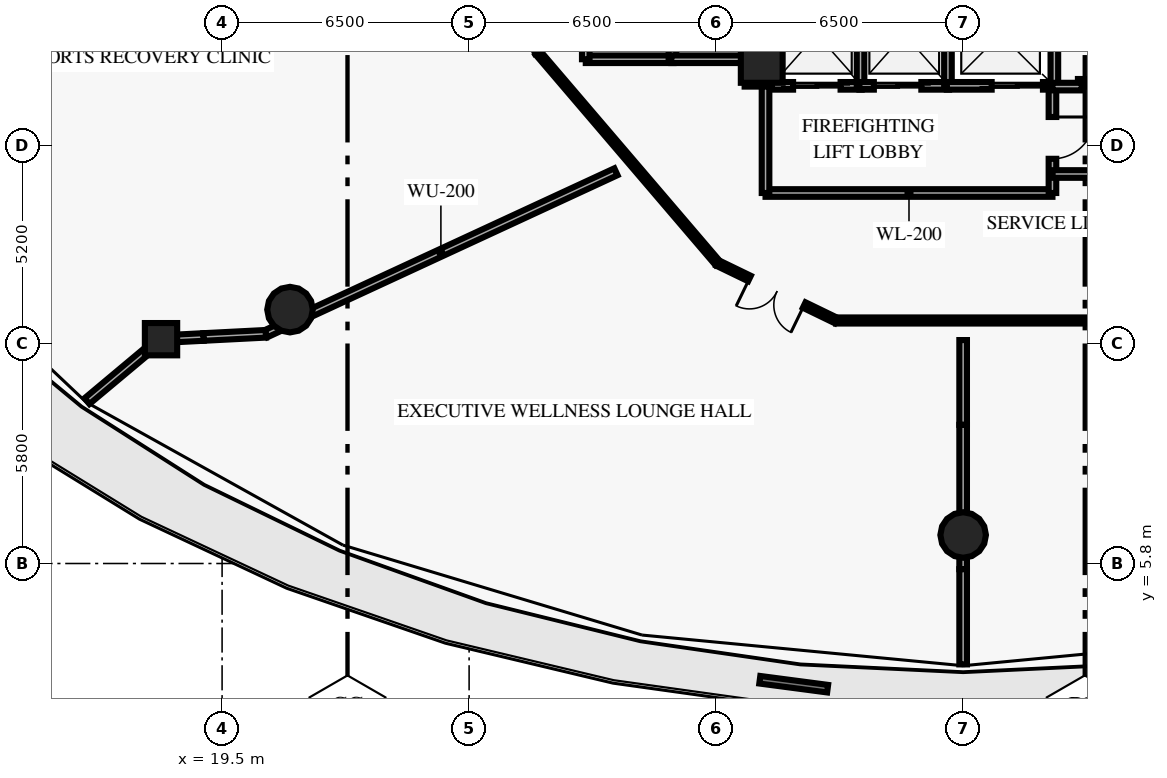
"""IFC4 building model, lengths in metres.
Left out: names, types, materials, properties, quantities, classifications, styles, units other than length and angle.
Written with IfcOpenShell. Run it as: python <this file> out.ifc"""

import sys

from ifc_helpers import new_model, si_unit, direction, frame, frame_2d, origin, origin_2d, place, context, subcontext, project, spatial, rectangle, circle, extrude, element, fill, save


model = new_model("IFC4")
c1 = context("Model", 3, precision=1e-05, world=origin(), true_north=direction((0.0, 1.0)))
c2 = subcontext(c1, "Body", "Model", "MODEL_VIEW")
j1 = project(units=[si_unit("LENGTHUNIT", "METRE"), si_unit("PLANEANGLEUNIT", "RADIAN")], contexts=[c1])
p1 = place(None, origin())
s1 = spatial("IfcSite", under=j1, at=p1, CompositionType="ELEMENT")
p2 = place(p1, origin())
s2 = spatial("IfcBuilding", under=s1, at=p2, CompositionType="ELEMENT")
p3 = place(p2, frame((0.0, 0.0, 16.0)))
s3 = spatial("IfcBuildingStorey", under=s2, at=p3, CompositionType="ELEMENT", Elevation=16.0)
p4 = place(p3, frame((33.7, 19.0, 0.0), z_axis=(0.0, 0.0, 1.0), x_axis=(1.0, 0.0, 0.0)))
e1 = element("IfcColumn", 1, at=p4, inside=s3, PredefinedType="PILASTER", context=c2, shape_type="SweptSolid", body=[
    extrude(rectangle(XDim=1.1, YDim=1.1, at=origin_2d()), origin(), (0.0, 0.0, 1.0), 4.74),
])
for number, where, z_axis, x_axis in (
    (2, (21.287, 12.481, 0.0), (0.0, 0.0, 1.0), (1.0, 0.0, 0.0)),
    (3, (39.0, 6.55, 0.0), (0.0, 0.0, 1.0), (1.0, 0.0, 0.0)),
):
    element("IfcColumn", number, at=place(p3, frame(where, z_axis=z_axis, x_axis=x_axis)), inside=s3, PredefinedType="COLUMN", context=c2, shape_type="SweptSolid", body=[
        extrude(circle(Radius=0.6, at=origin_2d()), origin(), (0.0, 0.0, 1.0), 4.74),
    ])
p5 = place(p3, frame((17.893, 11.703, 0.0), z_axis=(0.0, 0.0, 1.0), x_axis=(1.0, 0.0, 0.0)))
e4 = element("IfcColumn", 4, at=p5, inside=s3, PredefinedType="COLUMN", context=c2, shape_type="SweptSolid", body=[
    extrude(rectangle(XDim=0.85, YDim=0.85, at=origin_2d()), origin(), (0.0, 0.0, 1.0), 4.74),
])
p6 = place(p3, frame((33.7, 18.35, 0.0), z_axis=(0.0, 0.0, 1.0), x_axis=(0.0, 1.0, 0.0)))
e5 = element("IfcWall", 5, at=p6, inside=s3, PredefinedType="SHEAR", context=c2, shape_type="SweptSolid", body=[
    extrude(rectangle(XDim=2.95, YDim=0.9, at=frame_2d((1.475, 0.0))), origin(), (0.0, 0.0, 1.0), 4.74),
])
p7 = place(p3, frame((35.434, 2.506, 0.0), z_axis=(0.0, 0.0, 1.0), x_axis=(-0.991456141502, 0.130440482512, 0.0)))
e6 = element("IfcWall", 6, at=p7, inside=s3, PredefinedType="ELEMENTEDWALL", context=c2, shape_type="SweptSolid", body=[
    extrude(rectangle(XDim=1.801, YDim=0.2, at=frame_2d((0.9, 0.0))), origin(), (0.0, 0.0, 1.0), 0.65),
])
for number, where, z_axis, x_axis in (
    (7, (29.07, 19.07, 0.0), (0.0, 0.0, 1.0), (1.0, 0.0, 0.0)),
    (8, (29.07, 19.07, 0.0), (0.0, 0.0, 1.0), (0.0, 1.0, 0.0)),
    (9, (31.35, 19.07, 0.0), (0.0, 0.0, 1.0), (0.0, 1.0, 0.0)),
):
    element("IfcWall", number, at=place(p3, frame(where, z_axis=z_axis, x_axis=x_axis)), inside=s3, PredefinedType="SOLIDWALL", context=c2, shape_type="SweptSolid", body=[
        extrude(rectangle(XDim=2.31, YDim=0.2, at=frame_2d((1.155, 0.0))), origin(), (0.0, 0.0, 1.0), 4.74),
    ])
p8 = place(p3, frame((31.32, 19.07, 0.0), z_axis=(0.0, 0.0, 1.0), x_axis=(1.0, 0.0, 0.0)))
e10 = element("IfcWall", 10, at=p8, inside=s3, PredefinedType="SOLIDWALL", context=c2, shape_type="SweptSolid", body=[
    extrude(rectangle(XDim=2.11, YDim=0.2, at=frame_2d((1.055, 0.0))), origin(), (0.0, 0.0, 1.0), 4.74),
])
p9 = place(p3, frame((33.97, 18.37, 0.0), z_axis=(0.0, 0.0, 1.0), x_axis=(1.0, 0.0, 0.0)))
e11 = element("IfcWall", 11, at=p9, inside=s3, PredefinedType="SOLIDWALL", context=c2, shape_type="SweptSolid", body=[
    extrude(rectangle(XDim=2.36, YDim=0.2, at=frame_2d((1.18, 0.0))), origin(), (0.0, 0.0, 1.0), 4.74),
])
p10 = place(p9, frame((0.555, 0.0, 0.0)))
e12 = element("IfcOpeningElement", 12, at=p10, cuts=e11, PredefinedType="OPENING", context=c2, shape_type="SweptSolid", body=[
    extrude(rectangle(XDim=1.25, YDim=2.2, at=frame_2d((0.625, 1.1))), frame((0.0, 0.11, 0.0), z_axis=(0.0, -1.0, 0.0), x_axis=(1.0, 0.0, 0.0)), (0.0, 0.0, 1.0), 0.22),
])
p11 = place(p3, frame((36.3, 18.37, 0.0), z_axis=(0.0, 0.0, 1.0), x_axis=(0.0, 1.0, 0.0)))
e13 = element("IfcWall", 13, at=p11, inside=s3, PredefinedType="SOLIDWALL", context=c2, shape_type="SweptSolid", body=[
    extrude(rectangle(XDim=2.71, YDim=0.2, at=frame_2d((1.355, 0.0))), origin(), (0.0, 0.0, 1.0), 4.74),
])
p12 = place(p3, frame((36.27, 18.37, 0.0), z_axis=(0.0, 0.0, 1.0), x_axis=(1.0, 0.0, 0.0)))
e14 = element("IfcWall", 14, at=p12, inside=s3, PredefinedType="SOLIDWALL", context=c2, shape_type="SweptSolid", body=[
    extrude(rectangle(XDim=2.36, YDim=0.2, at=frame_2d((1.18, 0.0))), origin(), (0.0, 0.0, 1.0), 4.74),
])
p13 = place(p12, frame((0.38, 0.0, 0.0)))
e15 = element("IfcOpeningElement", 15, at=p13, cuts=e14, PredefinedType="OPENING", context=c2, shape_type="SweptSolid", body=[
    extrude(rectangle(XDim=1.25, YDim=2.2, at=frame_2d((0.625, 1.1))), frame((0.0, 0.11, 0.0), z_axis=(0.0, -1.0, 0.0), x_axis=(1.0, 0.0, 0.0)), (0.0, 0.0, 1.0), 0.22),
])
p14 = place(p3, frame((38.6, 18.37, 0.0), z_axis=(0.0, 0.0, 1.0), x_axis=(0.0, 1.0, 0.0)))
e16 = element("IfcWall", 16, at=p14, inside=s3, PredefinedType="SOLIDWALL", context=c2, shape_type="SweptSolid", body=[
    extrude(rectangle(XDim=2.71, YDim=0.2, at=frame_2d((1.355, 0.0))), origin(), (0.0, 0.0, 1.0), 4.74),
])
p15 = place(p3, frame((38.57, 18.37, 0.0), z_axis=(0.0, 0.0, 1.0), x_axis=(1.0, 0.0, 0.0)))
e17 = element("IfcWall", 17, at=p15, inside=s3, PredefinedType="SOLIDWALL", context=c2, shape_type="SweptSolid", body=[
    extrude(rectangle(XDim=2.83, YDim=0.2, at=frame_2d((1.415, 0.0))), origin(), (0.0, 0.0, 1.0), 4.74),
])
p16 = place(p15, frame((1.18, 0.0, 0.0)))
e18 = element("IfcOpeningElement", 18, at=p16, cuts=e17, PredefinedType="OPENING", context=c2, shape_type="SweptSolid", body=[
    extrude(rectangle(XDim=1.35, YDim=2.18, at=frame_2d((0.675, 1.09))), frame((0.0, 0.11, 0.0), z_axis=(0.0, -1.0, 0.0), x_axis=(1.0, 0.0, 0.0)), (0.0, 0.0, 1.0), 0.22),
])
p17 = place(p3, frame((41.4, 18.37, 0.0), z_axis=(0.0, 0.0, 1.0), x_axis=(0.0, 1.0, 0.0)))
e19 = element("IfcWall", 19, at=p17, inside=s3, PredefinedType="SOLIDWALL", context=c2, shape_type="SweptSolid", body=[
    extrude(rectangle(XDim=2.71, YDim=0.2, at=frame_2d((1.355, 0.0))), origin(), (0.0, 0.0, 1.0), 4.74),
])
p18 = place(p3, frame((33.8, 15.55, 0.0), z_axis=(0.0, 0.0, 1.0), x_axis=(1.0, 0.0, 0.0)))
e20 = element("IfcWall", 20, at=p18, inside=s3, PredefinedType="SOLIDWALL", context=c2, shape_type="SweptSolid", body=[
    extrude(rectangle(XDim=7.55, YDim=0.2, at=frame_2d((3.775, 0.0))), origin(), (0.0, 0.0, 1.0), 4.74),
])
p19 = place(p3, frame((33.8, 15.55, 0.0), z_axis=(0.0, 0.0, 1.0), x_axis=(0.0, 1.0, 0.0)))
e21 = element("IfcWall", 21, at=p19, inside=s3, PredefinedType="SOLIDWALL", context=c2, shape_type="SweptSolid", body=[
    extrude(rectangle(XDim=2.8, YDim=0.2, at=frame_2d((1.4, 0.0))), origin(), (0.0, 0.0, 1.0), 4.74),
])
p20 = place(p3, frame((41.35, 15.55, 0.0), z_axis=(0.0, 0.0, 1.0), x_axis=(0.0, 1.0, 0.0)))
e22 = element("IfcWall", 22, at=p20, inside=s3, PredefinedType="SOLIDWALL", context=c2, shape_type="SweptSolid", body=[
    extrude(rectangle(XDim=2.8, YDim=0.2, at=frame_2d((1.4, 0.0))), origin(), (0.0, 0.0, 1.0), 4.74),
])
p21 = place(p20, frame((0.9, 0.0, 0.0)))
e23 = element("IfcOpeningElement", 23, at=p21, cuts=e22, PredefinedType="OPENING", context=c2, shape_type="SweptSolid", body=[
    extrude(rectangle(XDim=1.1, YDim=2.15, at=frame_2d((0.55, 1.075))), frame((0.0, 0.11, 0.0), z_axis=(0.0, -1.0, 0.0), x_axis=(1.0, 0.0, 0.0)), (0.0, 0.0, 1.0), 0.22),
])
p22 = place(p3, frame((41.35, 16.05, 0.0), z_axis=(0.0, 0.0, 1.0), x_axis=(1.0, 0.0, 0.0)))
e24 = element("IfcWall", 24, at=p22, inside=s3, PredefinedType="SOLIDWALL", context=c2, shape_type="SweptSolid", body=[
    extrude(rectangle(XDim=4.5, YDim=0.2, at=frame_2d((2.25, 0.0))), origin(), (0.0, 0.0, 1.0), 4.74),
])
p23 = place(p3, frame((42.12, 18.35, 0.0), z_axis=(0.0, 0.0, 1.0), x_axis=(0.0, 1.0, 0.0)))
e25 = element("IfcWall", 25, at=p23, inside=s3, PredefinedType="SOLIDWALL", context=c2, shape_type="SweptSolid", body=[
    extrude(rectangle(XDim=2.95, YDim=0.2, at=frame_2d((1.475, 0.0))), origin(), (0.0, 0.0, 1.0), 4.74),
])
p24 = place(p23, frame((0.2, 0.0, 0.0)))
e26 = element("IfcOpeningElement", 26, at=p24, cuts=e25, PredefinedType="OPENING", context=c2, shape_type="SweptSolid", body=[
    extrude(rectangle(XDim=0.8, YDim=2.05, at=frame_2d((0.4, 1.025))), frame((0.0, 0.11, 0.0), z_axis=(0.0, -1.0, 0.0), x_axis=(1.0, 0.0, 0.0)), (0.0, 0.0, 1.0), 0.22),
])
p25 = place(p3, frame((41.35, 18.35, 0.0), z_axis=(0.0, 0.0, 1.0), x_axis=(1.0, 0.0, 0.0)))
e27 = element("IfcWall", 27, at=p25, inside=s3, PredefinedType="SOLIDWALL", context=c2, shape_type="SweptSolid", body=[
    extrude(rectangle(XDim=0.77, YDim=0.2, at=frame_2d((0.385, 0.0))), origin(), (0.0, 0.0, 1.0), 4.74),
])
p26 = place(p3, frame((27.811, 19.24, 0.0), z_axis=(0.0, 0.0, 1.0), x_axis=(-0.333704620558, 0.942677689467, 0.0)))
e28 = element("IfcWall", 28, at=p26, inside=s3, PredefinedType="PARTITIONING", context=c2, shape_type="SweptSolid", body=[
    extrude(rectangle(XDim=3.869, YDim=0.16, at=frame_2d((1.934, 0.0))), origin(), (0.0, 0.0, 1.0), 4.74),
])
p27 = place(p26, frame((1.134, 0.0, 0.0)))
e29 = element("IfcOpeningElement", 29, at=p27, cuts=e28, PredefinedType="OPENING", context=c2, shape_type="SweptSolid", body=[
    extrude(rectangle(XDim=1.6, YDim=2.2, at=frame_2d((0.8, 1.1))), frame((0.0, 0.09, 0.0), z_axis=(0.0, -1.0, 0.0), x_axis=(1.0, 0.0, 0.0)), (0.0, 0.0, 1.0), 0.18),
])
p28 = place(p3, frame((27.811, 19.24, 0.0), z_axis=(0.0, 0.0, 1.0), x_axis=(0.649652680018, -0.760231145998, 0.0)))
e30 = element("IfcWall", 30, at=p28, inside=s3, PredefinedType="PARTITIONING", context=c2, shape_type="SweptSolid", body=[
    extrude(rectangle(XDim=7.279, YDim=0.16, at=frame_2d((3.64, 0.0))), origin(), (0.0, 0.0, 1.0), 4.74),
])
p29 = place(p3, frame((35.656, 12.195, 0.0), z_axis=(0.0, 0.0, 1.0), x_axis=(-0.899789784655, 0.436323668199, 0.0)))
e31 = element("IfcWall", 31, at=p29, inside=s3, PredefinedType="PARTITIONING", context=c2, shape_type="SweptSolid", body=[
    extrude(rectangle(XDim=3.463, YDim=0.16, at=frame_2d((1.731, 0.0))), origin(), (0.0, 0.0, 1.0), 4.74),
])
p30 = place(p29, frame((0.932, 0.0, 0.0)))
e32 = element("IfcOpeningElement", 32, at=p30, cuts=e31, PredefinedType="OPENING", context=c2, shape_type="SweptSolid", body=[
    extrude(rectangle(XDim=1.6, YDim=2.2, at=frame_2d((0.8, 1.1))), frame((0.0, 0.09, 0.0), z_axis=(0.0, -1.0, 0.0), x_axis=(1.0, 0.0, 0.0)), (0.0, 0.0, 1.0), 0.18),
])
p31 = place(p3, frame((35.656, 12.195, 0.0), z_axis=(0.0, 0.0, 1.0), x_axis=(1.0, 0.0, 0.0)))
e33 = element("IfcWall", 33, at=p31, inside=s3, PredefinedType="PARTITIONING", context=c2, shape_type="SweptSolid", body=[
    extrude(rectangle(XDim=6.688, YDim=0.16, at=frame_2d((3.344, 0.0))), origin(), (0.0, 0.0, 1.0), 4.74),
])
p32 = place(p3, frame((29.864, 16.109, 0.0), z_axis=(0.0, 0.0, 1.0), x_axis=(-0.907520382507, -0.420008041988, 0.0)))
e34 = element("IfcWall", 34, at=p32, inside=s3, PredefinedType="PARTITIONING", context=c2, shape_type="SweptSolid", body=[
    extrude(rectangle(XDim=10.152, YDim=0.2, at=frame_2d((5.076, 0.0))), origin(), (0.0, 0.0, 1.0), 4.74),
])
p33 = place(p3, frame((20.651, 11.845, 0.0), z_axis=(0.0, 0.0, 1.0), x_axis=(-0.998692725363, -0.051115949639, 0.0)))
e35 = element("IfcWall", 35, at=p33, inside=s3, PredefinedType="PARTITIONING", context=c2, shape_type="SweptSolid", body=[
    extrude(rectangle(XDim=1.643, YDim=0.2, at=frame_2d((0.822, 0.0))), origin(), (0.0, 0.0, 1.0), 4.74),
])
p34 = place(p3, frame((19.01, 11.761, 0.0), z_axis=(0.0, 0.0, 1.0), x_axis=(-0.998649603439, -0.051951607785, 0.0)))
e36 = element("IfcWall", 36, at=p34, inside=s3, PredefinedType="PARTITIONING", context=c2, shape_type="SweptSolid", body=[
    extrude(rectangle(XDim=1.118, YDim=0.2, at=frame_2d((0.559, 0.0))), origin(), (0.0, 0.0, 1.0), 4.28),
])
p35 = place(p3, frame((17.893, 11.703, 0.0), z_axis=(0.0, 0.0, 1.0), x_axis=(-0.76695128647, -0.641705325038, 0.0)))
e37 = element("IfcWall", 37, at=p35, inside=s3, PredefinedType="PARTITIONING", context=c2, shape_type="SweptSolid", body=[
    extrude(rectangle(XDim=2.54, YDim=0.2, at=frame_2d((1.27, 0.0))), origin(), (0.0, 0.0, 1.0), 4.74),
])
p36 = place(p3, frame((39.0, 11.68, 0.0), z_axis=(0.0, 0.0, 1.0), x_axis=(0.0, -1.0, 0.0)))
e38 = element("IfcWall", 38, at=p36, inside=s3, PredefinedType="PARTITIONING", context=c2, shape_type="SweptSolid", body=[
    extrude(rectangle(XDim=2.231, YDim=0.2, at=frame_2d((1.115, 0.0))), origin(), (0.0, 0.0, 1.0), 4.74),
])
p37 = place(p3, frame((39.0, 9.449, 0.0), z_axis=(0.0, 0.0, 1.0), x_axis=(0.0, -1.0, 0.0)))
e39 = element("IfcWall", 39, at=p37, inside=s3, PredefinedType="PARTITIONING", context=c2, shape_type="SweptSolid", body=[
    extrude(rectangle(XDim=2.913, YDim=0.2, at=frame_2d((1.457, 0.0))), origin(), (0.0, 0.0, 1.0), 2.74),
])
p38 = place(p3, frame((39.0, 6.536, 0.0), z_axis=(0.0, 0.0, 1.0), x_axis=(0.0, -1.0, 0.0)))
e40 = element("IfcWall", 40, at=p38, inside=s3, PredefinedType="PARTITIONING", context=c2, shape_type="SweptSolid", body=[
    extrude(rectangle(XDim=0.886, YDim=0.2, at=frame_2d((0.443, 0.0))), origin(), (0.0, 0.0, 1.0), 4.74),
])
p39 = place(p3, frame((39.0, 5.65, 0.0), z_axis=(0.0, 0.0, 1.0), x_axis=(0.0, -1.0, 0.0)))
e41 = element("IfcWall", 41, at=p39, inside=s3, PredefinedType="PARTITIONING", context=c2, shape_type="SweptSolid", body=[
    extrude(rectangle(XDim=2.505, YDim=0.2, at=frame_2d((1.252, 0.0))), origin(), (0.0, 0.0, 1.0), 4.74),
])
p40 = place(p10, origin())
e42 = element("IfcDoor", 42, at=p40, inside=s3, OperationType="DOUBLE_DOOR_SLIDING", PredefinedType="DOOR", context=c2, shape_type="SweptSolid", body=[
    extrude(rectangle(XDim=1.25, YDim=2.2, at=frame_2d((0.625, 1.1))), frame((0.0, 0.025, 0.0), z_axis=(0.0, -1.0, 0.0), x_axis=(1.0, 0.0, 0.0)), (0.0, 0.0, 1.0), 0.05),
])
fill(e12, e42)
p41 = place(p13, origin())
e43 = element("IfcDoor", 43, at=p41, inside=s3, OperationType="DOUBLE_DOOR_SLIDING", PredefinedType="DOOR", context=c2, shape_type="SweptSolid", body=[
    extrude(rectangle(XDim=1.25, YDim=2.2, at=frame_2d((0.625, 1.1))), frame((0.0, 0.025, 0.0), z_axis=(0.0, -1.0, 0.0), x_axis=(1.0, 0.0, 0.0)), (0.0, 0.0, 1.0), 0.05),
])
fill(e15, e43)
p42 = place(p16, origin())
e44 = element("IfcDoor", 44, at=p42, inside=s3, OperationType="DOUBLE_DOOR_SLIDING", PredefinedType="DOOR", context=c2, shape_type="SweptSolid", body=[
    extrude(rectangle(XDim=1.35, YDim=2.18, at=frame_2d((0.675, 1.09))), frame((0.0, 0.025, 0.0), z_axis=(0.0, -1.0, 0.0), x_axis=(1.0, 0.0, 0.0)), (0.0, 0.0, 1.0), 0.05),
])
fill(e18, e44)
p43 = place(p21, origin())
e45 = element("IfcDoor", 45, at=p43, inside=s3, OperationType="SINGLE_SWING_RIGHT", PredefinedType="DOOR", context=c2, shape_type="SweptSolid", body=[
    extrude(rectangle(XDim=1.1, YDim=2.15, at=frame_2d((0.55, 1.075))), frame((0.0, 0.025, 0.0), z_axis=(0.0, -1.0, 0.0), x_axis=(1.0, 0.0, 0.0)), (0.0, 0.0, 1.0), 0.05),
])
fill(e23, e45)
p44 = place(p24, origin())
e46 = element("IfcDoor", 46, at=p44, inside=s3, OperationType="SINGLE_SWING_LEFT", PredefinedType="DOOR", context=c2, shape_type="SweptSolid", body=[
    extrude(rectangle(XDim=0.8, YDim=2.05, at=frame_2d((0.4, 1.025))), frame((0.0, 0.025, 0.0), z_axis=(0.0, -1.0, 0.0), x_axis=(1.0, 0.0, 0.0)), (0.0, 0.0, 1.0), 0.05),
])
fill(e26, e46)
p45 = place(p30, origin())
e47 = element("IfcDoor", 47, at=p45, inside=s3, OperationType="DOUBLE_DOOR_SINGLE_SWING", PredefinedType="DOOR", context=c2, shape_type="SweptSolid", body=[
    extrude(rectangle(XDim=1.6, YDim=2.2, at=frame_2d((0.8, 1.1))), frame((0.0, 0.025, 0.0), z_axis=(0.0, -1.0, 0.0), x_axis=(1.0, 0.0, 0.0)), (0.0, 0.0, 1.0), 0.05),
])
fill(e32, e47)
save(model, sys.argv[1])
